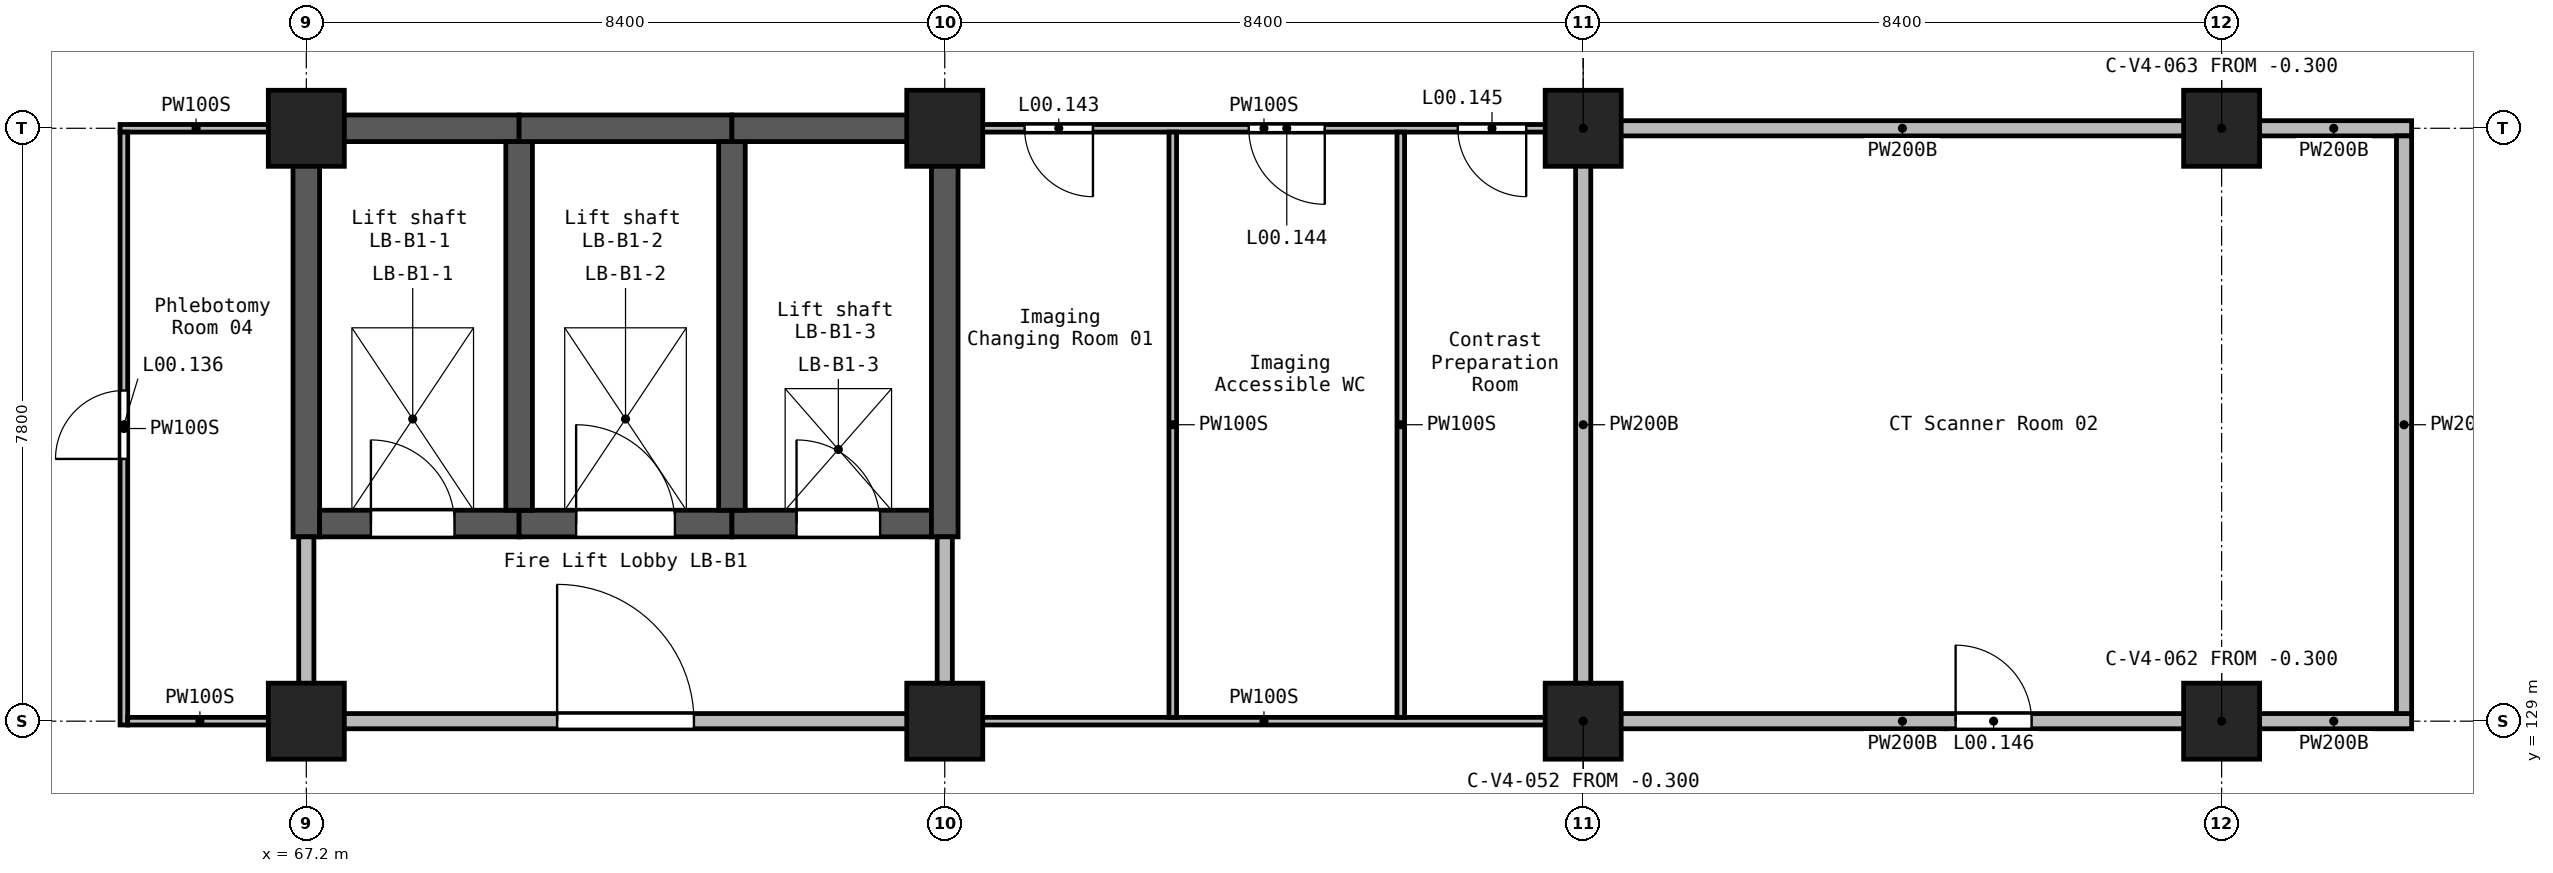
"""IFC4 building model, lengths in metres.
Left out: names, types, materials, properties, quantities, classifications, styles, units other than length and angle.
Written with IfcOpenShell. Run it as: python <this file> out.ifc"""

import sys

from ifc_helpers import new_model, si_unit, direction, frame, frame_2d, origin, origin_2d, place, context, subcontext, project, spatial, rectangle, extrude, element, fill, save


model = new_model("IFC4")
c1 = context("Model", 3, precision=1e-05, world=origin(), true_north=direction((0.0, 1.0)))
c2 = subcontext(c1, "Body", "Model", "MODEL_VIEW")
j1 = project(units=[si_unit("LENGTHUNIT", "METRE"), si_unit("PLANEANGLEUNIT", "RADIAN")], contexts=[c1])
p1 = place(None, origin())
s1 = spatial("IfcSite", under=j1, at=p1, CompositionType="ELEMENT")
p2 = place(p1, origin())
s2 = spatial("IfcBuilding", under=s1, at=p2, CompositionType="ELEMENT")
p3 = place(p2, origin())
s3 = spatial("IfcBuildingStorey", under=s2, at=p3, CompositionType="ELEMENT", Elevation=0.0)
for number, where, z_axis, x_axis in (
    (1, (67.2, 129.0, -0.3), (0.0, 0.0, 1.0), (1.0, 0.0, 0.0)),
    (2, (67.2, 136.8, -0.3), (0.0, 0.0, 1.0), (1.0, 0.0, 0.0)),
    (3, (75.6, 129.0, -0.3), (0.0, 0.0, 1.0), (1.0, 0.0, 0.0)),
    (4, (75.6, 136.8, -0.3), (0.0, 0.0, 1.0), (1.0, 0.0, 0.0)),
    (5, (84.0, 129.0, -0.3), (0.0, 0.0, 1.0), (1.0, 0.0, 0.0)),
    (6, (84.0, 136.8, -0.3), (0.0, 0.0, 1.0), (1.0, 0.0, 0.0)),
    (7, (92.4, 129.0, -0.3), (0.0, 0.0, 1.0), (1.0, 0.0, 0.0)),
    (8, (92.4, 136.8, -0.3), (0.0, 0.0, 1.0), (1.0, 0.0, 0.0)),
):
    element("IfcColumn", number, at=place(p3, frame(where, z_axis=z_axis, x_axis=x_axis)), inside=s3, PredefinedType="COLUMN", context=c2, shape_type="SweptSolid", body=[
        extrude(rectangle(XDim=1.0, YDim=1.0, at=origin_2d()), origin(), (0.0, 0.0, 1.0), 5.7),
    ])
p4 = place(p3, frame((67.025, 136.8, -0.3), z_axis=(0.0, 0.0, 1.0), x_axis=(1.0, 0.0, 0.0)))
e9 = element("IfcWall", 9, at=p4, inside=s3, PredefinedType="SHEAR", context=c2, shape_type="SweptSolid", body=[
    extrude(rectangle(XDim=2.975, YDim=0.35, at=frame_2d((1.488, 0.0))), origin(), (0.0, 0.0, 1.0), 5.7),
])
p5 = place(p3, frame((67.2, 131.425, -0.3), z_axis=(0.0, 0.0, 1.0), x_axis=(0.0, 1.0, 0.0)))
e10 = element("IfcWall", 10, at=p5, inside=s3, PredefinedType="SHEAR", context=c2, shape_type="SweptSolid", body=[
    extrude(rectangle(XDim=5.2, YDim=0.35, at=frame_2d((2.6, 0.0))), origin(), (0.0, 0.0, 1.0), 5.7),
])
p6 = place(p3, frame((67.375, 131.6, -0.3), z_axis=(0.0, 0.0, 1.0), x_axis=(1.0, 0.0, 0.0)))
e11 = element("IfcWall", 11, at=p6, inside=s3, PredefinedType="SHEAR", context=c2, shape_type="SweptSolid", body=[
    extrude(rectangle(XDim=2.625, YDim=0.35, at=frame_2d((1.312, 0.0))), origin(), (0.0, 0.0, 1.0), 5.7),
])
p7 = place(p6, frame((0.675, 0.0, 0.3)))
e12 = element("IfcOpeningElement", 12, at=p7, cuts=e11, PredefinedType="OPENING", context=c2, shape_type="SweptSolid", body=[
    extrude(rectangle(XDim=1.1, YDim=2.1, at=frame_2d((0.55, 1.05))), frame((0.0, 0.185, 0.0), z_axis=(0.0, -1.0, 0.0), x_axis=(1.0, 0.0, 0.0)), (0.0, 0.0, 1.0), 0.37),
])
p8 = place(p3, frame((70.0, 131.6, -0.3), z_axis=(0.0, 0.0, 1.0), x_axis=(1.0, 0.0, 0.0)))
e13 = element("IfcWall", 13, at=p8, inside=s3, PredefinedType="SHEAR", context=c2, shape_type="SweptSolid", body=[
    extrude(rectangle(XDim=2.8, YDim=0.35, at=frame_2d((1.4, 0.0))), origin(), (0.0, 0.0, 1.0), 5.7),
])
p9 = place(p8, frame((0.75, 0.0, 0.3)))
e14 = element("IfcOpeningElement", 14, at=p9, cuts=e13, PredefinedType="OPENING", context=c2, shape_type="SweptSolid", body=[
    extrude(rectangle(XDim=1.3, YDim=2.1, at=frame_2d((0.65, 1.05))), frame((0.0, 0.185, 0.0), z_axis=(0.0, -1.0, 0.0), x_axis=(1.0, 0.0, 0.0)), (0.0, 0.0, 1.0), 0.37),
])
p10 = place(p3, frame((70.0, 131.775, -0.3), z_axis=(0.0, 0.0, 1.0), x_axis=(0.0, 1.0, 0.0)))
e15 = element("IfcWall", 15, at=p10, inside=s3, PredefinedType="SHEAR", context=c2, shape_type="SweptSolid", body=[
    extrude(rectangle(XDim=4.85, YDim=0.35, at=frame_2d((2.425, 0.0))), origin(), (0.0, 0.0, 1.0), 5.7),
])
p11 = place(p3, frame((70.0, 136.8, -0.3), z_axis=(0.0, 0.0, 1.0), x_axis=(1.0, 0.0, 0.0)))
e16 = element("IfcWall", 16, at=p11, inside=s3, PredefinedType="SHEAR", context=c2, shape_type="SweptSolid", body=[
    extrude(rectangle(XDim=2.8, YDim=0.35, at=frame_2d((1.4, 0.0))), origin(), (0.0, 0.0, 1.0), 5.7),
])
p12 = place(p3, frame((72.8, 131.6, -0.3), z_axis=(0.0, 0.0, 1.0), x_axis=(1.0, 0.0, 0.0)))
e17 = element("IfcWall", 17, at=p12, inside=s3, PredefinedType="SHEAR", context=c2, shape_type="SweptSolid", body=[
    extrude(rectangle(XDim=2.625, YDim=0.35, at=frame_2d((1.312, 0.0))), origin(), (0.0, 0.0, 1.0), 5.7),
])
p13 = place(p12, frame((0.85, 0.0, 0.3)))
e18 = element("IfcOpeningElement", 18, at=p13, cuts=e17, PredefinedType="OPENING", context=c2, shape_type="SweptSolid", body=[
    extrude(rectangle(XDim=1.1, YDim=2.1, at=frame_2d((0.55, 1.05))), frame((0.0, 0.185, 0.0), z_axis=(0.0, -1.0, 0.0), x_axis=(1.0, 0.0, 0.0)), (0.0, 0.0, 1.0), 0.37),
])
p14 = place(p3, frame((72.8, 131.775, -0.3), z_axis=(0.0, 0.0, 1.0), x_axis=(0.0, 1.0, 0.0)))
e19 = element("IfcWall", 19, at=p14, inside=s3, PredefinedType="SHEAR", context=c2, shape_type="SweptSolid", body=[
    extrude(rectangle(XDim=4.85, YDim=0.35, at=frame_2d((2.425, 0.0))), origin(), (0.0, 0.0, 1.0), 5.7),
])
p15 = place(p3, frame((72.8, 136.8, -0.3), z_axis=(0.0, 0.0, 1.0), x_axis=(1.0, 0.0, 0.0)))
e20 = element("IfcWall", 20, at=p15, inside=s3, PredefinedType="SHEAR", context=c2, shape_type="SweptSolid", body=[
    extrude(rectangle(XDim=2.625, YDim=0.35, at=frame_2d((1.312, 0.0))), origin(), (0.0, 0.0, 1.0), 5.7),
])
p16 = place(p3, frame((75.6, 131.425, -0.3), z_axis=(0.0, 0.0, 1.0), x_axis=(0.0, 1.0, 0.0)))
e21 = element("IfcWall", 21, at=p16, inside=s3, PredefinedType="SHEAR", context=c2, shape_type="SweptSolid", body=[
    extrude(rectangle(XDim=5.55, YDim=0.35, at=frame_2d((2.775, 0.0))), origin(), (0.0, 0.0, 1.0), 5.7),
])
p17 = place(p3, frame((67.65, 129.0, 0.0), z_axis=(0.0, 0.0, 1.0), x_axis=(1.0, 0.0, 0.0)))
e22 = element("IfcWall", 22, at=p17, inside=s3, PredefinedType="SOLIDWALL", context=c2, shape_type="SweptSolid", body=[
    extrude(rectangle(XDim=7.5, YDim=0.2, at=frame_2d((3.75, 0.0))), origin(), (0.0, 0.0, 1.0), 5.05),
])
p18 = place(p17, frame((2.85, 0.0, 0.0)))
e23 = element("IfcOpeningElement", 23, at=p18, cuts=e22, PredefinedType="OPENING", context=c2, shape_type="SweptSolid", body=[
    extrude(rectangle(XDim=1.8, YDim=2.1, at=frame_2d((0.9, 1.05))), frame((0.0, 0.11, 0.0), z_axis=(0.0, -1.0, 0.0), x_axis=(1.0, 0.0, 0.0)), (0.0, 0.0, 1.0), 0.22),
])
for number, where, z_axis, x_axis in (
    (24, (67.2, 129.45, 0.0), (0.0, 0.0, 1.0), (0.0, 1.0, 0.0)),
    (25, (75.6, 129.45, 0.0), (0.0, 0.0, 1.0), (0.0, 1.0, 0.0)),
):
    element("IfcWall", number, at=place(p3, frame(where, z_axis=z_axis, x_axis=x_axis)), inside=s3, PredefinedType="SOLIDWALL", context=c2, shape_type="SweptSolid", body=[
        extrude(rectangle(XDim=1.975, YDim=0.2, at=frame_2d((0.988, 0.0))), origin(), (0.0, 0.0, 1.0), 5.05),
    ])
p19 = place(p3, frame((84.45, 129.0, 0.0), z_axis=(0.0, 0.0, 1.0), x_axis=(1.0, 0.0, 0.0)))
e26 = element("IfcWall", 26, at=p19, inside=s3, PredefinedType="SOLIDWALL", context=c2, shape_type="SweptSolid", body=[
    extrude(rectangle(XDim=7.5, YDim=0.2, at=frame_2d((3.75, 0.0))), origin(), (0.0, 0.0, 1.0), 5.05),
])
p20 = place(p19, frame((4.45, 0.0, 0.0)))
e27 = element("IfcOpeningElement", 27, at=p20, cuts=e26, PredefinedType="OPENING", context=c2, shape_type="SweptSolid", body=[
    extrude(rectangle(XDim=1.0, YDim=2.1, at=frame_2d((0.5, 1.05))), frame((0.0, 0.11, 0.0), z_axis=(0.0, -1.0, 0.0), x_axis=(1.0, 0.0, 0.0)), (0.0, 0.0, 1.0), 0.22),
])
p21 = place(p3, frame((92.85, 129.0, 0.0), z_axis=(0.0, 0.0, 1.0), x_axis=(1.0, 0.0, 0.0)))
e28 = element("IfcWall", 28, at=p21, inside=s3, PredefinedType="SOLIDWALL", context=c2, shape_type="SweptSolid", body=[
    extrude(rectangle(XDim=2.05, YDim=0.2, at=frame_2d((1.025, 0.0))), origin(), (0.0, 0.0, 1.0), 5.05),
])
p22 = place(p3, frame((84.45, 136.8, 0.0), z_axis=(0.0, 0.0, 1.0), x_axis=(1.0, 0.0, 0.0)))
e29 = element("IfcWall", 29, at=p22, inside=s3, PredefinedType="SOLIDWALL", context=c2, shape_type="SweptSolid", body=[
    extrude(rectangle(XDim=7.5, YDim=0.2, at=frame_2d((3.75, 0.0))), origin(), (0.0, 0.0, 1.0), 5.05),
])
p23 = place(p3, frame((92.85, 136.8, 0.0), z_axis=(0.0, 0.0, 1.0), x_axis=(1.0, 0.0, 0.0)))
e30 = element("IfcWall", 30, at=p23, inside=s3, PredefinedType="SOLIDWALL", context=c2, shape_type="SweptSolid", body=[
    extrude(rectangle(XDim=2.05, YDim=0.2, at=frame_2d((1.025, 0.0))), origin(), (0.0, 0.0, 1.0), 5.05),
])
p24 = place(p3, frame((84.0, 129.45, 0.0), z_axis=(0.0, 0.0, 1.0), x_axis=(0.0, 1.0, 0.0)))
e31 = element("IfcWall", 31, at=p24, inside=s3, PredefinedType="SOLIDWALL", context=c2, shape_type="SweptSolid", body=[
    extrude(rectangle(XDim=6.9, YDim=0.2, at=frame_2d((3.45, 0.0))), origin(), (0.0, 0.0, 1.0), 5.05),
])
p25 = place(p3, frame((94.8, 129.1, 0.0), z_axis=(0.0, 0.0, 1.0), x_axis=(0.0, 1.0, 0.0)))
e32 = element("IfcWall", 32, at=p25, inside=s3, PredefinedType="SOLIDWALL", context=c2, shape_type="SweptSolid", body=[
    extrude(rectangle(XDim=7.6, YDim=0.2, at=frame_2d((3.8, 0.0))), origin(), (0.0, 0.0, 1.0), 5.05),
])
p26 = place(p3, frame((83.55, 136.8, 0.0), z_axis=(0.0, 0.0, 1.0), x_axis=(-1.0, 0.0, 0.0)))
e33 = element("IfcWall", 33, at=p26, inside=s3, PredefinedType="PARTITIONING", context=c2, shape_type="SweptSolid", body=[
    extrude(rectangle(XDim=7.5, YDim=0.1, at=frame_2d((3.75, 0.0))), origin(), (0.0, 0.0, 1.0), 5.05),
])
p27 = place(p26, frame((6.0, 0.0, 0.0)))
e34 = element("IfcOpeningElement", 34, at=p27, cuts=e33, PredefinedType="OPENING", context=c2, shape_type="SweptSolid", body=[
    extrude(rectangle(XDim=0.9, YDim=2.1, at=frame_2d((0.45, 1.05))), frame((0.0, 0.06, 0.0), z_axis=(0.0, -1.0, 0.0), x_axis=(1.0, 0.0, 0.0)), (0.0, 0.0, 1.0), 0.12),
])
p28 = place(p26, frame((2.95, 0.0, 0.0)))
e35 = element("IfcOpeningElement", 35, at=p28, cuts=e33, PredefinedType="OPENING", context=c2, shape_type="SweptSolid", body=[
    extrude(rectangle(XDim=1.0, YDim=2.1, at=frame_2d((0.5, 1.05))), frame((0.0, 0.06, 0.0), z_axis=(0.0, -1.0, 0.0), x_axis=(1.0, 0.0, 0.0)), (0.0, 0.0, 1.0), 0.12),
])
p29 = place(p26, frame((0.3, 0.0, 0.0)))
e36 = element("IfcOpeningElement", 36, at=p29, cuts=e33, PredefinedType="OPENING", context=c2, shape_type="SweptSolid", body=[
    extrude(rectangle(XDim=0.9, YDim=2.1, at=frame_2d((0.45, 1.05))), frame((0.0, 0.06, 0.0), z_axis=(0.0, -1.0, 0.0), x_axis=(1.0, 0.0, 0.0)), (0.0, 0.0, 1.0), 0.12),
])
p30 = place(p3, frame((66.75, 136.8, 0.0), z_axis=(0.0, 0.0, 1.0), x_axis=(-1.0, 0.0, 0.0)))
e37 = element("IfcWall", 37, at=p30, inside=s3, PredefinedType="PARTITIONING", context=c2, shape_type="SweptSolid", body=[
    extrude(rectangle(XDim=2.0, YDim=0.1, at=frame_2d((1.0, 0.0))), origin(), (0.0, 0.0, 1.0), 5.05),
])
p31 = place(p3, frame((83.55, 129.0, 0.0), z_axis=(0.0, 0.0, 1.0), x_axis=(-1.0, 0.0, 0.0)))
e38 = element("IfcWall", 38, at=p31, inside=s3, PredefinedType="PARTITIONING", context=c2, shape_type="SweptSolid", body=[
    extrude(rectangle(XDim=7.5, YDim=0.1, at=frame_2d((3.75, 0.0))), origin(), (0.0, 0.0, 1.0), 5.05),
])
p32 = place(p3, frame((64.8, 128.95, 0.0), z_axis=(0.0, 0.0, 1.0), x_axis=(0.0, 1.0, 0.0)))
e39 = element("IfcWall", 39, at=p32, inside=s3, PredefinedType="PARTITIONING", context=c2, shape_type="SweptSolid", body=[
    extrude(rectangle(XDim=7.8, YDim=0.1, at=frame_2d((3.9, 0.0))), origin(), (0.0, 0.0, 1.0), 5.05),
])
p33 = place(p32, frame((3.5, 0.0, 0.0)))
e40 = element("IfcOpeningElement", 40, at=p33, cuts=e39, PredefinedType="OPENING", context=c2, shape_type="SweptSolid", body=[
    extrude(rectangle(XDim=0.9, YDim=2.1, at=frame_2d((0.45, 1.05))), frame((0.0, 0.06, 0.0), z_axis=(0.0, -1.0, 0.0), x_axis=(1.0, 0.0, 0.0)), (0.0, 0.0, 1.0), 0.12),
])
for number, where, z_axis, x_axis in (
    (41, (78.6, 129.05, 0.0), (0.0, 0.0, 1.0), (0.0, 1.0, 0.0)),
    (42, (81.6, 129.05, 0.0), (0.0, 0.0, 1.0), (0.0, 1.0, 0.0)),
):
    element("IfcWall", number, at=place(p3, frame(where, z_axis=z_axis, x_axis=x_axis)), inside=s3, PredefinedType="PARTITIONING", context=c2, shape_type="SweptSolid", body=[
        extrude(rectangle(XDim=7.7, YDim=0.1, at=frame_2d((3.85, 0.0))), origin(), (0.0, 0.0, 1.0), 5.05),
    ])
p34 = place(p3, frame((64.85, 129.0, 0.0), z_axis=(0.0, 0.0, 1.0), x_axis=(1.0, 0.0, 0.0)))
e43 = element("IfcWall", 43, at=p34, inside=s3, PredefinedType="PARTITIONING", context=c2, shape_type="SweptSolid", body=[
    extrude(rectangle(XDim=1.9, YDim=0.1, at=frame_2d((0.95, 0.0))), origin(), (0.0, 0.0, 1.0), 5.05),
])
p35 = place(p18, origin())
e44 = element("IfcDoor", 44, at=p35, inside=s3, OperationType="DOUBLE_DOOR_SINGLE_SWING", PredefinedType="DOOR", context=c2, shape_type="SweptSolid", body=[
    extrude(rectangle(XDim=1.8, YDim=2.1, at=frame_2d((0.9, 1.05))), frame((0.0, 0.025, 0.0), z_axis=(0.0, -1.0, 0.0), x_axis=(1.0, 0.0, 0.0)), (0.0, 0.0, 1.0), 0.05),
])
fill(e23, e44)
p36 = place(p33, frame((0.9, 0.0, 0.0), z_axis=(0.0, 0.0, 1.0), x_axis=(-1.0, 0.0, 0.0)))
e45 = element("IfcDoor", 45, at=p36, inside=s3, OperationType="SINGLE_SWING_LEFT", PredefinedType="DOOR", context=c2, shape_type="SweptSolid", body=[
    extrude(rectangle(XDim=0.9, YDim=2.1, at=frame_2d((0.45, 1.05))), frame((0.0, 0.025, 0.0), z_axis=(0.0, -1.0, 0.0), x_axis=(1.0, 0.0, 0.0)), (0.0, 0.0, 1.0), 0.05),
])
fill(e40, e45)
p37 = place(p27, origin())
e46 = element("IfcDoor", 46, at=p37, inside=s3, OperationType="SINGLE_SWING_RIGHT", PredefinedType="DOOR", context=c2, shape_type="SweptSolid", body=[
    extrude(rectangle(XDim=0.9, YDim=2.1, at=frame_2d((0.45, 1.05))), frame((0.0, 0.025, 0.0), z_axis=(0.0, -1.0, 0.0), x_axis=(1.0, 0.0, 0.0)), (0.0, 0.0, 1.0), 0.05),
])
fill(e34, e46)
p38 = place(p28, origin())
e47 = element("IfcDoor", 47, at=p38, inside=s3, OperationType="SINGLE_SWING_LEFT", PredefinedType="DOOR", context=c2, shape_type="SweptSolid", body=[
    extrude(rectangle(XDim=1.0, YDim=2.1, at=frame_2d((0.5, 1.05))), frame((0.0, 0.025, 0.0), z_axis=(0.0, -1.0, 0.0), x_axis=(1.0, 0.0, 0.0)), (0.0, 0.0, 1.0), 0.05),
])
fill(e35, e47)
p39 = place(p29, origin())
e48 = element("IfcDoor", 48, at=p39, inside=s3, OperationType="SINGLE_SWING_LEFT", PredefinedType="DOOR", context=c2, shape_type="SweptSolid", body=[
    extrude(rectangle(XDim=0.9, YDim=2.1, at=frame_2d((0.45, 1.05))), frame((0.0, 0.025, 0.0), z_axis=(0.0, -1.0, 0.0), x_axis=(1.0, 0.0, 0.0)), (0.0, 0.0, 1.0), 0.05),
])
fill(e36, e48)
p40 = place(p20, origin())
e49 = element("IfcDoor", 49, at=p40, inside=s3, OperationType="SINGLE_SWING_RIGHT", PredefinedType="DOOR", context=c2, shape_type="SweptSolid", body=[
    extrude(rectangle(XDim=1.0, YDim=2.1, at=frame_2d((0.5, 1.05))), frame((0.0, 0.025, 0.0), z_axis=(0.0, -1.0, 0.0), x_axis=(1.0, 0.0, 0.0)), (0.0, 0.0, 1.0), 0.05),
])
fill(e27, e49)
p41 = place(p7, origin())
e50 = element("IfcDoor", 50, at=p41, inside=s3, OperationType="DOUBLE_DOOR_SLIDING", PredefinedType="DOOR", context=c2, shape_type="SweptSolid", body=[
    extrude(rectangle(XDim=1.1, YDim=2.1, at=frame_2d((0.55, 1.05))), frame((0.0, 0.025, 0.0), z_axis=(0.0, -1.0, 0.0), x_axis=(1.0, 0.0, 0.0)), (0.0, 0.0, 1.0), 0.05),
])
fill(e12, e50)
p42 = place(p9, origin())
e51 = element("IfcDoor", 51, at=p42, inside=s3, OperationType="DOUBLE_DOOR_SLIDING", PredefinedType="DOOR", context=c2, shape_type="SweptSolid", body=[
    extrude(rectangle(XDim=1.3, YDim=2.1, at=frame_2d((0.65, 1.05))), frame((0.0, 0.025, 0.0), z_axis=(0.0, -1.0, 0.0), x_axis=(1.0, 0.0, 0.0)), (0.0, 0.0, 1.0), 0.05),
])
fill(e14, e51)
p43 = place(p13, origin())
e52 = element("IfcDoor", 52, at=p43, inside=s3, OperationType="DOUBLE_DOOR_SLIDING", PredefinedType="DOOR", context=c2, shape_type="SweptSolid", body=[
    extrude(rectangle(XDim=1.1, YDim=2.1, at=frame_2d((0.55, 1.05))), frame((0.0, 0.025, 0.0), z_axis=(0.0, -1.0, 0.0), x_axis=(1.0, 0.0, 0.0)), (0.0, 0.0, 1.0), 0.05),
])
fill(e18, e52)
save(model, sys.argv[1])
